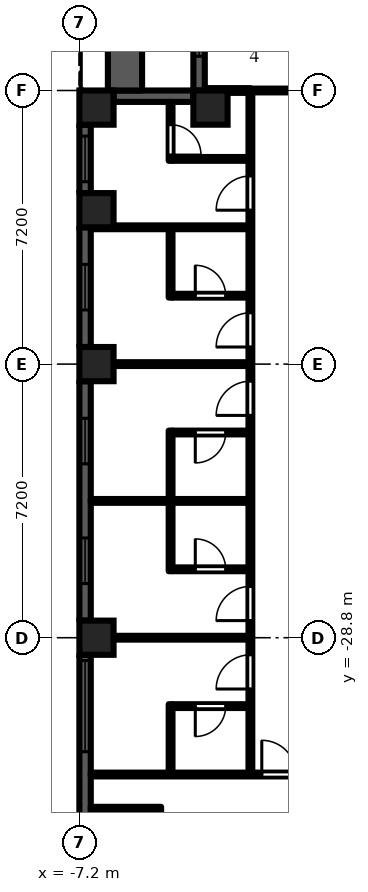
"""IFC4 building model, lengths in metres.
Left out: names, types, materials, properties, quantities, classifications, styles, units other than length and angle.
Written with IfcOpenShell. Run it as: python <this file> out.ifc"""

import sys

from ifc_helpers import new_model, si_unit, direction, frame, frame_2d, origin, origin_2d, place, context, subcontext, project, spatial, rectangle, extrude, element, fill, save


model = new_model("IFC4")
c1 = context("Model", 3, precision=1e-05, world=origin(), true_north=direction((0.0, 1.0)))
c2 = subcontext(c1, "Body", "Model", "MODEL_VIEW")
j1 = project(units=[si_unit("LENGTHUNIT", "METRE"), si_unit("PLANEANGLEUNIT", "RADIAN")], contexts=[c1])
p1 = place(None, origin())
s1 = spatial("IfcSite", under=j1, at=p1, CompositionType="ELEMENT")
p2 = place(p1, origin())
s2 = spatial("IfcBuilding", under=s1, at=p2, CompositionType="ELEMENT")
p3 = place(p2, frame((0.0, 0.0, 93.9)))
s3 = spatial("IfcBuildingStorey", under=s2, at=p3, CompositionType="ELEMENT", Elevation=93.9)
for number, where, z_axis, x_axis in (
    (1, (-6.75, -28.8, 0.0), (0.0, 0.0, 1.0), (1.0, 0.0, 0.0)),
    (2, (-6.75, -21.6, 0.0), (0.0, 0.0, 1.0), (1.0, 0.0, 0.0)),
    (3, (-6.75, -17.55, 0.0), (0.0, 0.0, 1.0), (1.0, 0.0, 0.0)),
    (4, (-6.75, -14.85, 0.0), (0.0, 0.0, 1.0), (1.0, 0.0, 0.0)),
    (5, (-3.75, -14.85, 0.0), (0.0, 0.0, 1.0), (1.0, 0.0, 0.0)),
):
    element("IfcColumn", number, at=place(p3, frame(where, z_axis=z_axis, x_axis=x_axis)), inside=s3, PredefinedType="COLUMN", context=c2, shape_type="SweptSolid", body=[
        extrude(rectangle(XDim=0.9, YDim=0.9, at=origin_2d()), origin(), (0.0, 0.0, 1.0), 3.0),
    ])
p4 = place(p3, frame((-4.05, -7.2, 0.0), z_axis=(0.0, 0.0, 1.0), x_axis=(0.0, -1.0, 0.0)))
e6 = element("IfcWall", 6, at=p4, inside=s3, PredefinedType="SOLIDWALL", context=c2, shape_type="SweptSolid", body=[
    extrude(rectangle(XDim=7.2, YDim=0.3, at=frame_2d((3.6, 0.0))), origin(), (0.0, 0.0, 1.0), 2.1),
])
p5 = place(p4, frame((3.0, 0.0, 0.0)))
e7 = element("IfcOpeningElement", 7, at=p5, cuts=e6, PredefinedType="OPENING", context=c2, shape_type="SweptSolid", body=[
    extrude(rectangle(XDim=1.2, YDim=2.05, at=frame_2d((0.6, 1.025))), frame((0.0, 0.16, 0.0), z_axis=(0.0, -1.0, 0.0), x_axis=(1.0, 0.0, 0.0)), (0.0, 0.0, 1.0), 0.32),
])
p6 = place(p4, frame((0.9, 0.0, 0.2)))
e8 = element("IfcOpeningElement", 8, at=p6, cuts=e6, PredefinedType="OPENING", context=c2, shape_type="SweptSolid", body=[
    extrude(rectangle(XDim=1.8, YDim=1.85, at=frame_2d((0.9, 0.925))), frame((0.0, 0.16, 0.0), z_axis=(0.0, -1.0, 0.0), x_axis=(1.0, 0.0, 0.0)), (0.0, 0.0, 1.0), 0.32),
])
p7 = place(p4, frame((4.5, 0.0, 0.2)))
e9 = element("IfcOpeningElement", 9, at=p7, cuts=e6, PredefinedType="OPENING", context=c2, shape_type="SweptSolid", body=[
    extrude(rectangle(XDim=1.8, YDim=1.85, at=frame_2d((0.9, 0.925))), frame((0.0, 0.16, 0.0), z_axis=(0.0, -1.0, 0.0), x_axis=(1.0, 0.0, 0.0)), (0.0, 0.0, 1.0), 0.32),
])
p8 = place(p3, frame((-4.2, -14.55, 0.0), z_axis=(0.0, 0.0, 1.0), x_axis=(-1.0, 0.0, 0.0)))
e10 = element("IfcWall", 10, at=p8, inside=s3, PredefinedType="SOLIDWALL", context=c2, shape_type="SweptSolid", body=[
    extrude(rectangle(XDim=2.1, YDim=0.3, at=frame_2d((1.05, 0.0))), origin(), (0.0, 0.0, 1.0), 2.1),
])
p9 = place(p3, frame((-7.05, -15.3, 0.0), z_axis=(0.0, 0.0, 1.0), x_axis=(0.0, -1.0, 0.0)))
e11 = element("IfcWall", 11, at=p9, inside=s3, PredefinedType="SOLIDWALL", context=c2, shape_type="SweptSolid", body=[
    extrude(rectangle(XDim=1.8, YDim=0.3, at=frame_2d((0.9, 0.0))), origin(), (0.0, 0.0, 1.0), 2.1),
])
p10 = place(p9, frame((0.3, 0.0, 0.2)))
e12 = element("IfcOpeningElement", 12, at=p10, cuts=e11, PredefinedType="OPENING", context=c2, shape_type="SweptSolid", body=[
    extrude(rectangle(XDim=1.2, YDim=1.85, at=frame_2d((0.6, 0.925))), frame((0.0, 0.16, 0.0), z_axis=(0.0, -1.0, 0.0), x_axis=(1.0, 0.0, 0.0)), (0.0, 0.0, 1.0), 0.32),
])
p11 = place(p3, frame((-7.05, -18.0, 0.0), z_axis=(0.0, 0.0, 1.0), x_axis=(0.0, -1.0, 0.0)))
e13 = element("IfcWall", 13, at=p11, inside=s3, PredefinedType="SOLIDWALL", context=c2, shape_type="SweptSolid", body=[
    extrude(rectangle(XDim=3.15, YDim=0.3, at=frame_2d((1.575, 0.0))), origin(), (0.0, 0.0, 1.0), 2.1),
])
p12 = place(p11, frame((0.975, 0.0, 0.2)))
e14 = element("IfcOpeningElement", 14, at=p12, cuts=e13, PredefinedType="OPENING", context=c2, shape_type="SweptSolid", body=[
    extrude(rectangle(XDim=1.2, YDim=1.85, at=frame_2d((0.6, 0.925))), frame((0.0, 0.16, 0.0), z_axis=(0.0, -1.0, 0.0), x_axis=(1.0, 0.0, 0.0)), (0.0, 0.0, 1.0), 0.32),
])
p13 = place(p3, frame((-7.05, -22.05, 0.0), z_axis=(0.0, 0.0, 1.0), x_axis=(0.0, -1.0, 0.0)))
e15 = element("IfcWall", 15, at=p13, inside=s3, PredefinedType="SOLIDWALL", context=c2, shape_type="SweptSolid", body=[
    extrude(rectangle(XDim=6.3, YDim=0.3, at=frame_2d((3.15, 0.0))), origin(), (0.0, 0.0, 1.0), 2.1),
])
p14 = place(p13, frame((0.975, 0.0, 0.2)))
e16 = element("IfcOpeningElement", 16, at=p14, cuts=e15, PredefinedType="OPENING", context=c2, shape_type="SweptSolid", body=[
    extrude(rectangle(XDim=1.2, YDim=1.85, at=frame_2d((0.6, 0.925))), frame((0.0, 0.16, 0.0), z_axis=(0.0, -1.0, 0.0), x_axis=(1.0, 0.0, 0.0)), (0.0, 0.0, 1.0), 0.32),
])
p15 = place(p13, frame((4.125, 0.0, 0.2)))
e17 = element("IfcOpeningElement", 17, at=p15, cuts=e15, PredefinedType="OPENING", context=c2, shape_type="SweptSolid", body=[
    extrude(rectangle(XDim=1.2, YDim=1.85, at=frame_2d((0.6, 0.925))), frame((0.0, 0.16, 0.0), z_axis=(0.0, -1.0, 0.0), x_axis=(1.0, 0.0, 0.0)), (0.0, 0.0, 1.0), 0.32),
])
p16 = place(p3, frame((-7.05, -29.25, 0.0), z_axis=(0.0, 0.0, 1.0), x_axis=(0.0, -1.0, 0.0)))
e18 = element("IfcWall", 18, at=p16, inside=s3, PredefinedType="SOLIDWALL", context=c2, shape_type="SweptSolid", body=[
    extrude(rectangle(XDim=6.3, YDim=0.3, at=frame_2d((3.15, 0.0))), origin(), (0.0, 0.0, 1.0), 2.1),
])
p17 = place(p16, frame((0.15, 0.0, 0.2)))
e19 = element("IfcOpeningElement", 19, at=p17, cuts=e18, PredefinedType="OPENING", context=c2, shape_type="SweptSolid", body=[
    extrude(rectangle(XDim=2.4, YDim=1.85, at=frame_2d((1.2, 0.925))), frame((0.0, 0.16, 0.0), z_axis=(0.0, -1.0, 0.0), x_axis=(1.0, 0.0, 0.0)), (0.0, 0.0, 1.0), 0.32),
])
p18 = place(p3, frame((-6.0, -14.4, 0.0), z_axis=(0.0, 0.0, 1.0), x_axis=(0.0, 1.0, 0.0)))
e20 = element("IfcWall", 20, at=p18, inside=s3, PredefinedType="PARAPET", context=c2, shape_type="SweptSolid", body=[
    extrude(rectangle(XDim=7.2, YDim=0.9, at=frame_2d((3.6, 0.0))), origin(), (0.0, 0.0, 1.0), 0.8),
])
p19 = place(p3, frame((-6.9, -33.3, 0.0), z_axis=(0.0, 0.0, 1.0), x_axis=(1.0, 0.0, 0.0)))
e21 = element("IfcWall", 21, at=p19, inside=s3, PredefinedType="PARTITIONING", context=c2, shape_type="SweptSolid", body=[
    extrude(rectangle(XDim=1.85, YDim=0.1, at=frame_2d((0.925, 0.0))), origin(), (0.0, 0.0, 1.0), 2.575),
])
p20 = place(p3, frame((-6.9, -32.4, 0.0), z_axis=(0.0, 0.0, 1.0), x_axis=(1.0, 0.0, 0.0)))
e22 = element("IfcWall", 22, at=p20, inside=s3, PredefinedType="PARTITIONING", context=c2, shape_type="SweptSolid", body=[
    extrude(rectangle(XDim=5.625, YDim=0.1, at=frame_2d((2.812, 0.0))), origin(), (0.0, 0.0, 1.0), 2.575),
])
p21 = place(p20, frame((4.5, 0.0, 0.0)))
e23 = element("IfcOpeningElement", 23, at=p21, cuts=e22, PredefinedType="OPENING", context=c2, shape_type="SweptSolid", body=[
    extrude(rectangle(XDim=0.9, YDim=2.1, at=frame_2d((0.45, 1.05))), frame((0.0, 0.06, 0.0), z_axis=(0.0, -1.0, 0.0), x_axis=(1.0, 0.0, 0.0)), (0.0, 0.0, 1.0), 0.12),
])
for number, where, z_axis, x_axis in (
    (24, (-6.9, -28.8, 0.0), (0.0, 0.0, 1.0), (1.0, 0.0, 0.0)),
    (25, (-6.9, -25.2, 0.0), (0.0, 0.0, 1.0), (1.0, 0.0, 0.0)),
    (26, (-6.9, -21.6, 0.0), (0.0, 0.0, 1.0), (1.0, 0.0, 0.0)),
    (27, (-6.9, -18.0, 0.0), (0.0, 0.0, 1.0), (1.0, 0.0, 0.0)),
):
    element("IfcWall", number, at=place(p3, frame(where, z_axis=z_axis, x_axis=x_axis)), inside=s3, PredefinedType="PARTITIONING", context=c2, shape_type="SweptSolid", body=[
        extrude(rectangle(XDim=4.15, YDim=0.1, at=frame_2d((2.075, 0.0))), origin(), (0.0, 0.0, 1.0), 2.575),
    ])
p22 = place(p3, frame((-5.1, -35.05, 0.0), z_axis=(0.0, 0.0, 1.0), x_axis=(0.0, 1.0, 0.0)))
e28 = element("IfcWall", 28, at=p22, inside=s3, PredefinedType="PARTITIONING", context=c2, shape_type="SweptSolid", body=[
    extrude(rectangle(XDim=1.7, YDim=0.1, at=frame_2d((0.85, 0.0))), origin(), (0.0, 0.0, 1.0), 2.575),
])
p23 = place(p22, frame((0.45, 0.0, 0.0)))
e29 = element("IfcOpeningElement", 29, at=p23, cuts=e28, PredefinedType="OPENING", context=c2, shape_type="SweptSolid", body=[
    extrude(rectangle(XDim=0.8, YDim=2.1, at=frame_2d((0.4, 1.05))), frame((0.0, 0.06, 0.0), z_axis=(0.0, -1.0, 0.0), x_axis=(1.0, 0.0, 0.0)), (0.0, 0.0, 1.0), 0.12),
])
p24 = place(p3, frame((-4.8, -32.35, 0.0), z_axis=(0.0, 0.0, 1.0), x_axis=(0.0, 1.0, 0.0)))
e30 = element("IfcWall", 30, at=p24, inside=s3, PredefinedType="PARTITIONING", context=c2, shape_type="SweptSolid", body=[
    extrude(rectangle(XDim=1.8, YDim=0.1, at=frame_2d((0.9, 0.0))), origin(), (0.0, 0.0, 1.0), 2.575),
])
p25 = place(p3, frame((-4.75, -30.6, 0.0), z_axis=(0.0, 0.0, 1.0), x_axis=(1.0, 0.0, 0.0)))
e31 = element("IfcWall", 31, at=p25, inside=s3, PredefinedType="PARTITIONING", context=c2, shape_type="SweptSolid", body=[
    extrude(rectangle(XDim=2.0, YDim=0.1, at=frame_2d((1.0, 0.0))), origin(), (0.0, 0.0, 1.0), 2.575),
])
p26 = place(p25, frame((0.6, 0.0, 0.0)))
e32 = element("IfcOpeningElement", 32, at=p26, cuts=e31, PredefinedType="OPENING", context=c2, shape_type="SweptSolid", body=[
    extrude(rectangle(XDim=0.8, YDim=2.1, at=frame_2d((0.4, 1.05))), frame((0.0, 0.06, 0.0), z_axis=(0.0, -1.0, 0.0), x_axis=(1.0, 0.0, 0.0)), (0.0, 0.0, 1.0), 0.12),
])
p27 = place(p3, frame((-4.8, -27.05, 0.0), z_axis=(0.0, 0.0, 1.0), x_axis=(0.0, 1.0, 0.0)))
e33 = element("IfcWall", 33, at=p27, inside=s3, PredefinedType="PARTITIONING", context=c2, shape_type="SweptSolid", body=[
    extrude(rectangle(XDim=3.7, YDim=0.1, at=frame_2d((1.85, 0.0))), origin(), (0.0, 0.0, 1.0), 2.575),
])
p28 = place(p3, frame((-4.75, -27.0, 0.0), z_axis=(0.0, 0.0, 1.0), x_axis=(1.0, 0.0, 0.0)))
e34 = element("IfcWall", 34, at=p28, inside=s3, PredefinedType="PARTITIONING", context=c2, shape_type="SweptSolid", body=[
    extrude(rectangle(XDim=2.0, YDim=0.1, at=frame_2d((1.0, 0.0))), origin(), (0.0, 0.0, 1.0), 2.575),
])
p29 = place(p28, frame((0.6, 0.0, 0.0)))
e35 = element("IfcOpeningElement", 35, at=p29, cuts=e34, PredefinedType="OPENING", context=c2, shape_type="SweptSolid", body=[
    extrude(rectangle(XDim=0.8, YDim=2.1, at=frame_2d((0.4, 1.05))), frame((0.0, 0.06, 0.0), z_axis=(0.0, -1.0, 0.0), x_axis=(1.0, 0.0, 0.0)), (0.0, 0.0, 1.0), 0.12),
])
p30 = place(p3, frame((-4.75, -23.4, 0.0), z_axis=(0.0, 0.0, 1.0), x_axis=(1.0, 0.0, 0.0)))
e36 = element("IfcWall", 36, at=p30, inside=s3, PredefinedType="PARTITIONING", context=c2, shape_type="SweptSolid", body=[
    extrude(rectangle(XDim=2.0, YDim=0.1, at=frame_2d((1.0, 0.0))), origin(), (0.0, 0.0, 1.0), 2.575),
])
p31 = place(p30, frame((0.6, 0.0, 0.0)))
e37 = element("IfcOpeningElement", 37, at=p31, cuts=e36, PredefinedType="OPENING", context=c2, shape_type="SweptSolid", body=[
    extrude(rectangle(XDim=0.8, YDim=2.1, at=frame_2d((0.4, 1.05))), frame((0.0, 0.06, 0.0), z_axis=(0.0, -1.0, 0.0), x_axis=(1.0, 0.0, 0.0)), (0.0, 0.0, 1.0), 0.12),
])
p32 = place(p3, frame((-4.8, -19.85, 0.0), z_axis=(0.0, 0.0, 1.0), x_axis=(0.0, 1.0, 0.0)))
e38 = element("IfcWall", 38, at=p32, inside=s3, PredefinedType="PARTITIONING", context=c2, shape_type="SweptSolid", body=[
    extrude(rectangle(XDim=1.8, YDim=0.1, at=frame_2d((0.9, 0.0))), origin(), (0.0, 0.0, 1.0), 2.575),
])
p33 = place(p3, frame((-4.75, -19.8, 0.0), z_axis=(0.0, 0.0, 1.0), x_axis=(1.0, 0.0, 0.0)))
e39 = element("IfcWall", 39, at=p33, inside=s3, PredefinedType="PARTITIONING", context=c2, shape_type="SweptSolid", body=[
    extrude(rectangle(XDim=2.0, YDim=0.1, at=frame_2d((1.0, 0.0))), origin(), (0.0, 0.0, 1.0), 2.575),
])
p34 = place(p33, frame((0.6, 0.0, 0.0)))
e40 = element("IfcOpeningElement", 40, at=p34, cuts=e39, PredefinedType="OPENING", context=c2, shape_type="SweptSolid", body=[
    extrude(rectangle(XDim=0.8, YDim=2.1, at=frame_2d((0.4, 1.05))), frame((0.0, 0.06, 0.0), z_axis=(0.0, -1.0, 0.0), x_axis=(1.0, 0.0, 0.0)), (0.0, 0.0, 1.0), 0.12),
])
p35 = place(p3, frame((-4.8, -16.25, 0.0), z_axis=(0.0, 0.0, 1.0), x_axis=(0.0, 1.0, 0.0)))
e41 = element("IfcWall", 41, at=p35, inside=s3, PredefinedType="PARTITIONING", context=c2, shape_type="SweptSolid", body=[
    extrude(rectangle(XDim=1.55, YDim=0.1, at=frame_2d((0.775, 0.0))), origin(), (0.0, 0.0, 1.0), 2.575),
])
p36 = place(p35, frame((0.15, 0.0, 0.0)))
e42 = element("IfcOpeningElement", 42, at=p36, cuts=e41, PredefinedType="OPENING", context=c2, shape_type="SweptSolid", body=[
    extrude(rectangle(XDim=0.8, YDim=2.1, at=frame_2d((0.4, 1.05))), frame((0.0, 0.06, 0.0), z_axis=(0.0, -1.0, 0.0), x_axis=(1.0, 0.0, 0.0)), (0.0, 0.0, 1.0), 0.12),
])
p37 = place(p3, frame((-4.75, -16.2, 0.0), z_axis=(0.0, 0.0, 1.0), x_axis=(1.0, 0.0, 0.0)))
e43 = element("IfcWall", 43, at=p37, inside=s3, PredefinedType="PARTITIONING", context=c2, shape_type="SweptSolid", body=[
    extrude(rectangle(XDim=2.0, YDim=0.1, at=frame_2d((1.0, 0.0))), origin(), (0.0, 0.0, 1.0), 2.575),
])
p38 = place(p3, frame((-3.9, -14.4, 0.0), z_axis=(0.0, 0.0, 1.0), x_axis=(1.0, 0.0, 0.0)))
e44 = element("IfcWall", 44, at=p38, inside=s3, PredefinedType="PARTITIONING", context=c2, shape_type="SweptSolid", body=[
    extrude(rectangle(XDim=1.2, YDim=0.125, at=frame_2d((0.6, 0.0))), origin(), (0.0, 0.0, 1.0), 2.575),
])
p39 = place(p3, frame((-2.7, -32.35, 0.0), z_axis=(0.0, 0.0, 1.0), x_axis=(0.0, 1.0, 0.0)))
e45 = element("IfcWall", 45, at=p39, inside=s3, PredefinedType="PARTITIONING", context=c2, shape_type="SweptSolid", body=[
    extrude(rectangle(XDim=17.888, YDim=0.1, at=frame_2d((8.944, 0.0))), origin(), (0.0, 0.0, 1.0), 2.575),
])
p40 = place(p39, frame((2.2, 0.0, 0.0)))
e46 = element("IfcOpeningElement", 46, at=p40, cuts=e45, PredefinedType="OPENING", context=c2, shape_type="SweptSolid", body=[
    extrude(rectangle(XDim=0.9, YDim=2.1, at=frame_2d((0.45, 1.05))), frame((0.0, 0.06, 0.0), z_axis=(0.0, -1.0, 0.0), x_axis=(1.0, 0.0, 0.0)), (0.0, 0.0, 1.0), 0.12),
])
p41 = place(p39, frame((4.0, 0.0, 0.0)))
e47 = element("IfcOpeningElement", 47, at=p41, cuts=e45, PredefinedType="OPENING", context=c2, shape_type="SweptSolid", body=[
    extrude(rectangle(XDim=0.9, YDim=2.1, at=frame_2d((0.45, 1.05))), frame((0.0, 0.06, 0.0), z_axis=(0.0, -1.0, 0.0), x_axis=(1.0, 0.0, 0.0)), (0.0, 0.0, 1.0), 0.12),
])
p42 = place(p39, frame((9.4, 0.0, 0.0)))
e48 = element("IfcOpeningElement", 48, at=p42, cuts=e45, PredefinedType="OPENING", context=c2, shape_type="SweptSolid", body=[
    extrude(rectangle(XDim=0.9, YDim=2.1, at=frame_2d((0.45, 1.05))), frame((0.0, 0.06, 0.0), z_axis=(0.0, -1.0, 0.0), x_axis=(1.0, 0.0, 0.0)), (0.0, 0.0, 1.0), 0.12),
])
p43 = place(p39, frame((11.2, 0.0, 0.0)))
e49 = element("IfcOpeningElement", 49, at=p43, cuts=e45, PredefinedType="OPENING", context=c2, shape_type="SweptSolid", body=[
    extrude(rectangle(XDim=0.9, YDim=2.1, at=frame_2d((0.45, 1.05))), frame((0.0, 0.06, 0.0), z_axis=(0.0, -1.0, 0.0), x_axis=(1.0, 0.0, 0.0)), (0.0, 0.0, 1.0), 0.12),
])
p44 = place(p39, frame((14.8, 0.0, 0.0)))
e50 = element("IfcOpeningElement", 50, at=p44, cuts=e45, PredefinedType="OPENING", context=c2, shape_type="SweptSolid", body=[
    extrude(rectangle(XDim=0.9, YDim=2.1, at=frame_2d((0.45, 1.05))), frame((0.0, 0.06, 0.0), z_axis=(0.0, -1.0, 0.0), x_axis=(1.0, 0.0, 0.0)), (0.0, 0.0, 1.0), 0.12),
])
p45 = place(p3, frame((-2.7, -14.4, 0.0), z_axis=(0.0, 0.0, 1.0), x_axis=(1.0, 0.0, 0.0)))
e51 = element("IfcWall", 51, at=p45, inside=s3, PredefinedType="PARTITIONING", context=c2, shape_type="SweptSolid", body=[
    extrude(rectangle(XDim=1.425, YDim=0.1, at=frame_2d((0.712, 0.0))), origin(), (0.0, 0.0, 1.0), 2.575),
])
p46 = place(p7, origin())
e52 = element("IfcWindow", 52, at=p46, inside=s3, PartitioningType="SINGLE_PANEL", PredefinedType="WINDOW", context=c2, shape_type="SweptSolid", body=[
    extrude(rectangle(XDim=1.8, YDim=1.85, at=frame_2d((0.9, 0.925))), frame((0.0, 0.03, 0.0), z_axis=(0.0, -1.0, 0.0), x_axis=(1.0, 0.0, 0.0)), (0.0, 0.0, 1.0), 0.06),
])
fill(e9, e52)
p47 = place(p10, origin())
e53 = element("IfcWindow", 53, at=p47, inside=s3, PartitioningType="SINGLE_PANEL", PredefinedType="WINDOW", context=c2, shape_type="SweptSolid", body=[
    extrude(rectangle(XDim=1.2, YDim=1.85, at=frame_2d((0.6, 0.925))), frame((0.0, 0.03, 0.0), z_axis=(0.0, -1.0, 0.0), x_axis=(1.0, 0.0, 0.0)), (0.0, 0.0, 1.0), 0.06),
])
fill(e12, e53)
p48 = place(p12, origin())
e54 = element("IfcWindow", 54, at=p48, inside=s3, PartitioningType="SINGLE_PANEL", PredefinedType="WINDOW", context=c2, shape_type="SweptSolid", body=[
    extrude(rectangle(XDim=1.2, YDim=1.85, at=frame_2d((0.6, 0.925))), frame((0.0, 0.03, 0.0), z_axis=(0.0, -1.0, 0.0), x_axis=(1.0, 0.0, 0.0)), (0.0, 0.0, 1.0), 0.06),
])
fill(e14, e54)
p49 = place(p14, origin())
e55 = element("IfcWindow", 55, at=p49, inside=s3, PartitioningType="SINGLE_PANEL", PredefinedType="WINDOW", context=c2, shape_type="SweptSolid", body=[
    extrude(rectangle(XDim=1.2, YDim=1.85, at=frame_2d((0.6, 0.925))), frame((0.0, 0.03, 0.0), z_axis=(0.0, -1.0, 0.0), x_axis=(1.0, 0.0, 0.0)), (0.0, 0.0, 1.0), 0.06),
])
fill(e16, e55)
p50 = place(p15, origin())
e56 = element("IfcWindow", 56, at=p50, inside=s3, PartitioningType="SINGLE_PANEL", PredefinedType="WINDOW", context=c2, shape_type="SweptSolid", body=[
    extrude(rectangle(XDim=1.2, YDim=1.85, at=frame_2d((0.6, 0.925))), frame((0.0, 0.03, 0.0), z_axis=(0.0, -1.0, 0.0), x_axis=(1.0, 0.0, 0.0)), (0.0, 0.0, 1.0), 0.06),
])
fill(e17, e56)
p51 = place(p17, origin())
e57 = element("IfcWindow", 57, at=p51, inside=s3, PartitioningType="SINGLE_PANEL", PredefinedType="WINDOW", context=c2, shape_type="SweptSolid", body=[
    extrude(rectangle(XDim=2.4, YDim=1.85, at=frame_2d((1.2, 0.925))), frame((0.0, 0.03, 0.0), z_axis=(0.0, -1.0, 0.0), x_axis=(1.0, 0.0, 0.0)), (0.0, 0.0, 1.0), 0.06),
])
fill(e19, e57)
p52 = place(p40, origin())
e58 = element("IfcDoor", 58, at=p52, inside=s3, OperationType="SINGLE_SWING_LEFT", PredefinedType="DOOR", context=c2, shape_type="SweptSolid", body=[
    extrude(rectangle(XDim=0.9, YDim=2.1, at=frame_2d((0.45, 1.05))), frame((0.0, 0.025, 0.0), z_axis=(0.0, -1.0, 0.0), x_axis=(1.0, 0.0, 0.0)), (0.0, 0.0, 1.0), 0.05),
])
fill(e46, e58)
p53 = place(p41, origin())
e59 = element("IfcDoor", 59, at=p53, inside=s3, OperationType="SINGLE_SWING_LEFT", PredefinedType="DOOR", context=c2, shape_type="SweptSolid", body=[
    extrude(rectangle(XDim=0.9, YDim=2.1, at=frame_2d((0.45, 1.05))), frame((0.0, 0.025, 0.0), z_axis=(0.0, -1.0, 0.0), x_axis=(1.0, 0.0, 0.0)), (0.0, 0.0, 1.0), 0.05),
])
fill(e47, e59)
p54 = place(p42, origin())
e60 = element("IfcDoor", 60, at=p54, inside=s3, OperationType="SINGLE_SWING_LEFT", PredefinedType="DOOR", context=c2, shape_type="SweptSolid", body=[
    extrude(rectangle(XDim=0.9, YDim=2.1, at=frame_2d((0.45, 1.05))), frame((0.0, 0.025, 0.0), z_axis=(0.0, -1.0, 0.0), x_axis=(1.0, 0.0, 0.0)), (0.0, 0.0, 1.0), 0.05),
])
fill(e48, e60)
p55 = place(p43, origin())
e61 = element("IfcDoor", 61, at=p55, inside=s3, OperationType="SINGLE_SWING_LEFT", PredefinedType="DOOR", context=c2, shape_type="SweptSolid", body=[
    extrude(rectangle(XDim=0.9, YDim=2.1, at=frame_2d((0.45, 1.05))), frame((0.0, 0.025, 0.0), z_axis=(0.0, -1.0, 0.0), x_axis=(1.0, 0.0, 0.0)), (0.0, 0.0, 1.0), 0.05),
])
fill(e49, e61)
p56 = place(p44, origin())
e62 = element("IfcDoor", 62, at=p56, inside=s3, OperationType="SINGLE_SWING_LEFT", PredefinedType="DOOR", context=c2, shape_type="SweptSolid", body=[
    extrude(rectangle(XDim=0.9, YDim=2.1, at=frame_2d((0.45, 1.05))), frame((0.0, 0.025, 0.0), z_axis=(0.0, -1.0, 0.0), x_axis=(1.0, 0.0, 0.0)), (0.0, 0.0, 1.0), 0.05),
])
fill(e50, e62)
p57 = place(p21, origin())
e63 = element("IfcDoor", 63, at=p57, inside=s3, OperationType="SINGLE_SWING_LEFT", PredefinedType="DOOR", context=c2, shape_type="SweptSolid", body=[
    extrude(rectangle(XDim=0.9, YDim=2.1, at=frame_2d((0.45, 1.05))), frame((0.0, 0.025, 0.0), z_axis=(0.0, -1.0, 0.0), x_axis=(1.0, 0.0, 0.0)), (0.0, 0.0, 1.0), 0.05),
])
fill(e23, e63)
p58 = place(p36, frame((0.8, 0.0, 0.0), z_axis=(0.0, 0.0, 1.0), x_axis=(-1.0, 0.0, 0.0)))
e64 = element("IfcDoor", 64, at=p58, inside=s3, OperationType="SINGLE_SWING_RIGHT", PredefinedType="DOOR", context=c2, shape_type="SweptSolid", body=[
    extrude(rectangle(XDim=0.8, YDim=2.1, at=frame_2d((0.4, 1.05))), frame((0.0, 0.025, 0.0), z_axis=(0.0, -1.0, 0.0), x_axis=(1.0, 0.0, 0.0)), (0.0, 0.0, 1.0), 0.05),
])
fill(e42, e64)
p59 = place(p34, origin())
e65 = element("IfcDoor", 65, at=p59, inside=s3, OperationType="SINGLE_SWING_LEFT", PredefinedType="DOOR", context=c2, shape_type="SweptSolid", body=[
    extrude(rectangle(XDim=0.8, YDim=2.1, at=frame_2d((0.4, 1.05))), frame((0.0, 0.025, 0.0), z_axis=(0.0, -1.0, 0.0), x_axis=(1.0, 0.0, 0.0)), (0.0, 0.0, 1.0), 0.05),
])
fill(e40, e65)
p60 = place(p31, frame((0.8, 0.0, 0.0), z_axis=(0.0, 0.0, 1.0), x_axis=(-1.0, 0.0, 0.0)))
e66 = element("IfcDoor", 66, at=p60, inside=s3, OperationType="SINGLE_SWING_RIGHT", PredefinedType="DOOR", context=c2, shape_type="SweptSolid", body=[
    extrude(rectangle(XDim=0.8, YDim=2.1, at=frame_2d((0.4, 1.05))), frame((0.0, 0.025, 0.0), z_axis=(0.0, -1.0, 0.0), x_axis=(1.0, 0.0, 0.0)), (0.0, 0.0, 1.0), 0.05),
])
fill(e37, e66)
p61 = place(p29, origin())
e67 = element("IfcDoor", 67, at=p61, inside=s3, OperationType="SINGLE_SWING_LEFT", PredefinedType="DOOR", context=c2, shape_type="SweptSolid", body=[
    extrude(rectangle(XDim=0.8, YDim=2.1, at=frame_2d((0.4, 1.05))), frame((0.0, 0.025, 0.0), z_axis=(0.0, -1.0, 0.0), x_axis=(1.0, 0.0, 0.0)), (0.0, 0.0, 1.0), 0.05),
])
fill(e35, e67)
p62 = place(p26, frame((0.8, 0.0, 0.0), z_axis=(0.0, 0.0, 1.0), x_axis=(-1.0, 0.0, 0.0)))
e68 = element("IfcDoor", 68, at=p62, inside=s3, OperationType="SINGLE_SWING_RIGHT", PredefinedType="DOOR", context=c2, shape_type="SweptSolid", body=[
    extrude(rectangle(XDim=0.8, YDim=2.1, at=frame_2d((0.4, 1.05))), frame((0.0, 0.025, 0.0), z_axis=(0.0, -1.0, 0.0), x_axis=(1.0, 0.0, 0.0)), (0.0, 0.0, 1.0), 0.05),
])
fill(e32, e68)
save(model, sys.argv[1])
